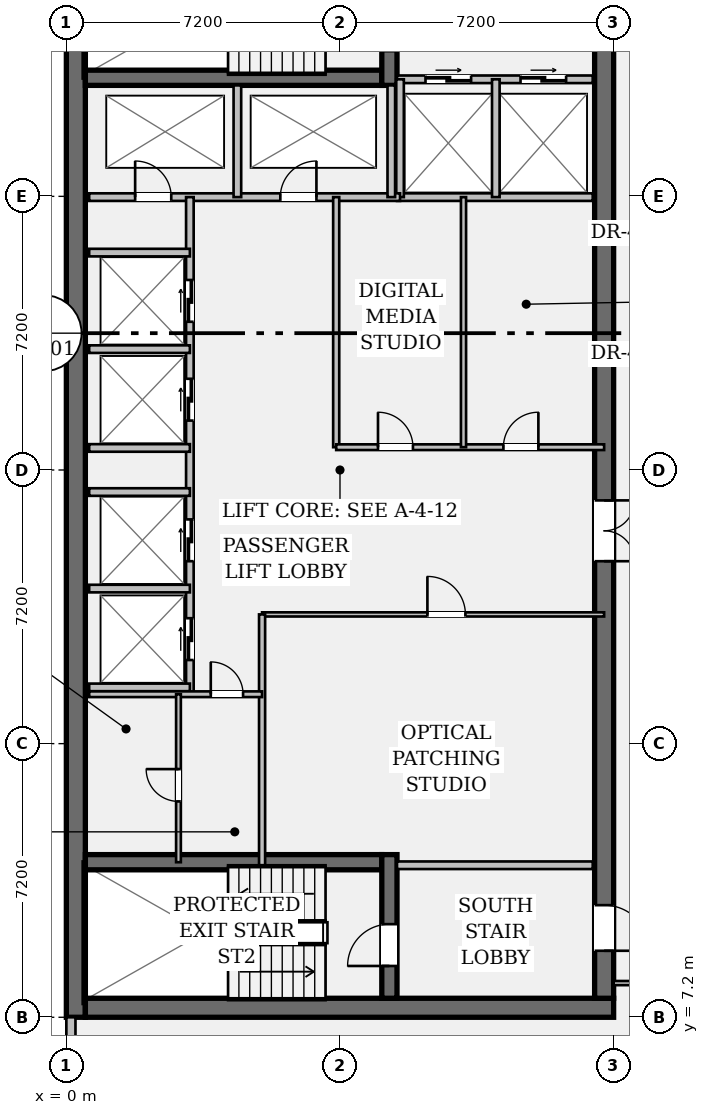
"""IFC4 building model, lengths in metres.
Left out: names, types, materials, properties, quantities, classifications, styles, units other than length and angle.
Written with IfcOpenShell. Run it as: python <this file> out.ifc"""

import sys

from ifc_helpers import new_model, si_unit, direction, frame, frame_2d, origin, place, context, subcontext, project, spatial, rectangle, extrude, element, fill, save


model = new_model("IFC4")
c1 = context("Model", 3, precision=1e-05, world=origin(), true_north=direction((0.0, 1.0)))
c2 = subcontext(c1, "Body", "Model", "MODEL_VIEW")
j1 = project(units=[si_unit("LENGTHUNIT", "METRE"), si_unit("PLANEANGLEUNIT", "RADIAN")], contexts=[c1])
p1 = place(None, origin())
s1 = spatial("IfcSite", under=j1, at=p1, CompositionType="ELEMENT")
p2 = place(p1, origin())
s2 = spatial("IfcBuilding", under=s1, at=p2, CompositionType="ELEMENT")
p3 = place(p2, frame((0.0, 0.0, 187.25)))
s3 = spatial("IfcBuildingStorey", under=s2, at=p3, CompositionType="ELEMENT", Elevation=187.25)
p4 = place(p3, frame((0.25, 7.2, 0.0), z_axis=(0.0, 0.0, 1.0), x_axis=(0.0, 1.0, 0.0)))
e1 = element("IfcWall", 1, at=p4, inside=s3, PredefinedType="SHEAR", context=c2, shape_type="SweptSolid", body=[
    extrude(rectangle(XDim=28.8, YDim=0.5, at=frame_2d((14.4, 0.0))), origin(), (0.0, 0.0, 1.0), 3.24),
])
p5 = place(p3, frame((0.5, 7.45, 0.0), z_axis=(0.0, 0.0, 1.0), x_axis=(1.0, 0.0, 0.0)))
e2 = element("IfcWall", 2, at=p5, inside=s3, PredefinedType="SHEAR", context=c2, shape_type="SweptSolid", body=[
    extrude(rectangle(XDim=13.9, YDim=0.5, at=frame_2d((6.95, 0.0))), origin(), (0.0, 0.0, 1.0), 3.24),
])
p6 = place(p3, frame((14.15, 35.5, 0.0), z_axis=(0.0, 0.0, 1.0), x_axis=(0.0, -1.0, 0.0)))
e3 = element("IfcWall", 3, at=p6, inside=s3, PredefinedType="SHEAR", context=c2, shape_type="SweptSolid", body=[
    extrude(rectangle(XDim=27.8, YDim=0.5, at=frame_2d((13.9, 0.0))), origin(), (0.0, 0.0, 1.0), 3.24),
])
p7 = place(p6, frame((1.4, 0.0, 0.0)))
e4 = element("IfcOpeningElement", 4, at=p7, cuts=e3, PredefinedType="OPENING", context=c2, shape_type="SweptSolid", body=[
    extrude(rectangle(XDim=1.2, YDim=2.15, at=frame_2d((0.6, 1.075))), frame((0.0, 0.262, 0.0), z_axis=(0.0, -1.0, 0.0), x_axis=(1.0, 0.0, 0.0)), (0.0, 0.0, 1.0), 0.524),
])
p8 = place(p6, frame((25.35, 0.0, 0.0)))
e5 = element("IfcOpeningElement", 5, at=p8, cuts=e3, PredefinedType="OPENING", context=c2, shape_type="SweptSolid", body=[
    extrude(rectangle(XDim=1.2, YDim=2.15, at=frame_2d((0.6, 1.075))), frame((0.0, 0.262, 0.0), z_axis=(0.0, -1.0, 0.0), x_axis=(1.0, 0.0, 0.0)), (0.0, 0.0, 1.0), 0.524),
])
p9 = place(p6, frame((14.7, 0.0, 0.0)))
e6 = element("IfcOpeningElement", 6, at=p9, cuts=e3, PredefinedType="OPENING", context=c2, shape_type="SweptSolid", body=[
    extrude(rectangle(XDim=1.6, YDim=2.2, at=frame_2d((0.8, 1.1))), frame((0.0, 0.262, 0.0), z_axis=(0.0, -1.0, 0.0), x_axis=(1.0, 0.0, 0.0)), (0.0, 0.0, 1.0), 0.524),
])
for number, where, z_axis, x_axis in (
    (7, (0.5, 31.92, 0.0), (0.0, 0.0, 1.0), (1.0, 0.0, 0.0)),
    (8, (0.5, 11.28, 0.0), (0.0, 0.0, 1.0), (1.0, 0.0, 0.0)),
):
    element("IfcWall", number, at=place(p3, frame(where, z_axis=z_axis, x_axis=x_axis)), inside=s3, PredefinedType="SHEAR", context=c2, shape_type="SweptSolid", body=[
        extrude(rectangle(XDim=7.8, YDim=0.4, at=frame_2d((3.9, 0.0))), origin(), (0.0, 0.0, 1.0), 3.24),
    ])
p10 = place(p3, frame((8.5, 31.72, 0.0), z_axis=(0.0, 0.0, 1.0), x_axis=(0.0, 1.0, 0.0)))
e9 = element("IfcWall", 9, at=p10, inside=s3, PredefinedType="SHEAR", context=c2, shape_type="SweptSolid", body=[
    extrude(rectangle(XDim=3.78, YDim=0.4, at=frame_2d((1.89, 0.0))), origin(), (0.0, 0.0, 1.0), 3.24),
])
p11 = place(p10, frame((0.9, 0.0, 0.0)))
e10 = element("IfcOpeningElement", 10, at=p11, cuts=e9, PredefinedType="OPENING", context=c2, shape_type="SweptSolid", body=[
    extrude(rectangle(XDim=1.1, YDim=2.15, at=frame_2d((0.55, 1.075))), frame((0.0, 0.212, 0.0), z_axis=(0.0, -1.0, 0.0), x_axis=(1.0, 0.0, 0.0)), (0.0, 0.0, 1.0), 0.424),
])
p12 = place(p3, frame((8.5, 7.7, 0.0), z_axis=(0.0, 0.0, 1.0), x_axis=(0.0, 1.0, 0.0)))
e11 = element("IfcWall", 11, at=p12, inside=s3, PredefinedType="SHEAR", context=c2, shape_type="SweptSolid", body=[
    extrude(rectangle(XDim=3.78, YDim=0.4, at=frame_2d((1.89, 0.0))), origin(), (0.0, 0.0, 1.0), 3.24),
])
p13 = place(p12, frame((0.85, 0.0, 0.0)))
e12 = element("IfcOpeningElement", 12, at=p13, cuts=e11, PredefinedType="OPENING", context=c2, shape_type="SweptSolid", body=[
    extrude(rectangle(XDim=1.1, YDim=2.15, at=frame_2d((0.55, 1.075))), frame((0.0, 0.212, 0.0), z_axis=(0.0, -1.0, 0.0), x_axis=(1.0, 0.0, 0.0)), (0.0, 0.0, 1.0), 0.424),
])
p14 = place(p3, frame((0.12, 5.87, 0.0), z_axis=(0.0, 0.0, 1.0), x_axis=(0.0, 1.0, 0.0)))
e13 = element("IfcWall", 13, at=p14, inside=s3, PredefinedType="STANDARD", context=c2, shape_type="SweptSolid", body=[
    extrude(rectangle(XDim=1.33, YDim=0.24, at=frame_2d((0.665, 0.0))), origin(), (0.0, 0.0, 1.0), 3.24),
])
p15 = place(p3, frame((8.7, 31.88, 0.0), z_axis=(0.0, 0.0, 1.0), x_axis=(1.0, 0.0, 0.0)))
e14 = element("IfcWall", 14, at=p15, inside=s3, PredefinedType="PARTITIONING", context=c2, shape_type="SweptSolid", body=[
    extrude(rectangle(XDim=5.15, YDim=0.2, at=frame_2d((2.575, 0.0))), origin(), (0.0, 0.0, 1.0), 3.24),
])
p16 = place(p15, frame((0.75, 0.0, 0.0)))
e15 = element("IfcOpeningElement", 15, at=p16, cuts=e14, PredefinedType="OPENING", context=c2, shape_type="SweptSolid", body=[
    extrude(rectangle(XDim=1.2, YDim=2.2, at=frame_2d((0.6, 1.1))), frame((0.0, 0.112, 0.0), z_axis=(0.0, -1.0, 0.0), x_axis=(1.0, 0.0, 0.0)), (0.0, 0.0, 1.0), 0.224),
])
p17 = place(p15, frame((3.25, 0.0, 0.0)))
e16 = element("IfcOpeningElement", 16, at=p17, cuts=e14, PredefinedType="OPENING", context=c2, shape_type="SweptSolid", body=[
    extrude(rectangle(XDim=1.2, YDim=2.2, at=frame_2d((0.6, 1.1))), frame((0.0, 0.112, 0.0), z_axis=(0.0, -1.0, 0.0), x_axis=(1.0, 0.0, 0.0)), (0.0, 0.0, 1.0), 0.224),
])
for number, where, z_axis, x_axis in (
    (17, (8.7, 11.2, 0.0), (0.0, 0.0, 1.0), (1.0, 0.0, 0.0)),
    (18, (8.7, 28.78, 0.0), (0.0, 0.0, 1.0), (1.0, 0.0, 0.0)),
):
    element("IfcWall", number, at=place(p3, frame(where, z_axis=z_axis, x_axis=x_axis)), inside=s3, PredefinedType="PARTITIONING", context=c2, shape_type="SweptSolid", body=[
        extrude(rectangle(XDim=5.15, YDim=0.2, at=frame_2d((2.575, 0.0))), origin(), (0.0, 0.0, 1.0), 3.24),
    ])
for number, where, z_axis, x_axis in (
    (19, (8.78, 28.78, 0.0), (0.0, 0.0, 1.0), (0.0, 1.0, 0.0)),
    (20, (11.3, 28.78, 0.0), (0.0, 0.0, 1.0), (0.0, 1.0, 0.0)),
):
    element("IfcWall", number, at=place(p3, frame(where, z_axis=z_axis, x_axis=x_axis)), inside=s3, PredefinedType="PARTITIONING", context=c2, shape_type="SweptSolid", body=[
        extrude(rectangle(XDim=3.1, YDim=0.2, at=frame_2d((1.55, 0.0))), origin(), (0.0, 0.0, 1.0), 3.24),
    ])
p18 = place(p3, frame((0.6, 28.78, 0.0), z_axis=(0.0, 0.0, 1.0), x_axis=(1.0, 0.0, 0.0)))
e21 = element("IfcWall", 21, at=p18, inside=s3, PredefinedType="PARTITIONING", context=c2, shape_type="SweptSolid", body=[
    extrude(rectangle(XDim=8.18, YDim=0.2, at=frame_2d((4.09, 0.0))), origin(), (0.0, 0.0, 1.0), 3.24),
])
p19 = place(p18, frame((1.21, 0.0, 0.0)))
e22 = element("IfcOpeningElement", 22, at=p19, cuts=e21, PredefinedType="OPENING", context=c2, shape_type="SweptSolid", body=[
    extrude(rectangle(XDim=0.95, YDim=2.15, at=frame_2d((0.475, 1.075))), frame((0.0, 0.112, 0.0), z_axis=(0.0, -1.0, 0.0), x_axis=(1.0, 0.0, 0.0)), (0.0, 0.0, 1.0), 0.224),
])
p20 = place(p18, frame((5.03, 0.0, 0.0)))
e23 = element("IfcOpeningElement", 23, at=p20, cuts=e21, PredefinedType="OPENING", context=c2, shape_type="SweptSolid", body=[
    extrude(rectangle(XDim=0.95, YDim=2.15, at=frame_2d((0.475, 1.075))), frame((0.0, 0.112, 0.0), z_axis=(0.0, -1.0, 0.0), x_axis=(1.0, 0.0, 0.0)), (0.0, 0.0, 1.0), 0.224),
])
for number, where, z_axis, x_axis in (
    (24, (4.5, 28.78, 0.0), (0.0, 0.0, 1.0), (0.0, 1.0, 0.0)),
    (25, (8.55, 28.78, 0.0), (0.0, 0.0, 1.0), (0.0, 1.0, 0.0)),
):
    element("IfcWall", number, at=place(p3, frame(where, z_axis=z_axis, x_axis=x_axis)), inside=s3, PredefinedType="PARTITIONING", context=c2, shape_type="SweptSolid", body=[
        extrude(rectangle(XDim=2.94, YDim=0.2, at=frame_2d((1.47, 0.0))), origin(), (0.0, 0.0, 1.0), 3.24),
    ])
p21 = place(p3, frame((3.25, 15.7, 0.0), z_axis=(0.0, 0.0, 1.0), x_axis=(0.0, 1.0, 0.0)))
e26 = element("IfcWall", 26, at=p21, inside=s3, PredefinedType="PARTITIONING", context=c2, shape_type="SweptSolid", body=[
    extrude(rectangle(XDim=13.08, YDim=0.2, at=frame_2d((6.54, 0.0))), origin(), (0.0, 0.0, 1.0), 3.24),
])
p22 = place(p21, frame((0.9, 0.0, 0.0)))
e27 = element("IfcOpeningElement", 27, at=p22, cuts=e26, PredefinedType="OPENING", context=c2, shape_type="SweptSolid", body=[
    extrude(rectangle(XDim=1.1, YDim=2.2, at=frame_2d((0.55, 1.1))), frame((0.0, 0.112, 0.0), z_axis=(0.0, -1.0, 0.0), x_axis=(1.0, 0.0, 0.0)), (0.0, 0.0, 1.0), 0.224),
])
p23 = place(p21, frame((3.5, 0.0, 0.0)))
e28 = element("IfcOpeningElement", 28, at=p23, cuts=e26, PredefinedType="OPENING", context=c2, shape_type="SweptSolid", body=[
    extrude(rectangle(XDim=1.1, YDim=2.2, at=frame_2d((0.55, 1.1))), frame((0.0, 0.112, 0.0), z_axis=(0.0, -1.0, 0.0), x_axis=(1.0, 0.0, 0.0)), (0.0, 0.0, 1.0), 0.224),
])
p24 = place(p21, frame((7.2, 0.0, 0.0)))
e29 = element("IfcOpeningElement", 29, at=p24, cuts=e26, PredefinedType="OPENING", context=c2, shape_type="SweptSolid", body=[
    extrude(rectangle(XDim=1.1, YDim=2.2, at=frame_2d((0.55, 1.1))), frame((0.0, 0.112, 0.0), z_axis=(0.0, -1.0, 0.0), x_axis=(1.0, 0.0, 0.0)), (0.0, 0.0, 1.0), 0.224),
])
p25 = place(p21, frame((9.8, 0.0, 0.0)))
e30 = element("IfcOpeningElement", 30, at=p25, cuts=e26, PredefinedType="OPENING", context=c2, shape_type="SweptSolid", body=[
    extrude(rectangle(XDim=1.1, YDim=2.2, at=frame_2d((0.55, 1.1))), frame((0.0, 0.112, 0.0), z_axis=(0.0, -1.0, 0.0), x_axis=(1.0, 0.0, 0.0)), (0.0, 0.0, 1.0), 0.224),
])
for number, where, z_axis, x_axis in (
    (31, (0.6, 15.88, 0.0), (0.0, 0.0, 1.0), (1.0, 0.0, 0.0)),
    (32, (0.6, 18.48, 0.0), (0.0, 0.0, 1.0), (1.0, 0.0, 0.0)),
    (33, (0.6, 22.18, 0.0), (0.0, 0.0, 1.0), (1.0, 0.0, 0.0)),
    (34, (0.6, 24.78, 0.0), (0.0, 0.0, 1.0), (1.0, 0.0, 0.0)),
    (35, (0.6, 21.02, 0.0), (0.0, 0.0, 1.0), (1.0, 0.0, 0.0)),
    (36, (0.6, 27.32, 0.0), (0.0, 0.0, 1.0), (1.0, 0.0, 0.0)),
):
    element("IfcWall", number, at=place(p3, frame(where, z_axis=z_axis, x_axis=x_axis)), inside=s3, PredefinedType="PARTITIONING", context=c2, shape_type="SweptSolid", body=[
        extrude(rectangle(XDim=2.65, YDim=0.2, at=frame_2d((1.325, 0.0))), origin(), (0.0, 0.0, 1.0), 3.24),
    ])
p26 = place(p3, frame((7.1, 22.2, 0.0), z_axis=(0.0, 0.0, 1.0), x_axis=(0.0, 1.0, 0.0)))
e37 = element("IfcWall", 37, at=p26, inside=s3, PredefinedType="PARTITIONING", context=c2, shape_type="SweptSolid", body=[
    extrude(rectangle(XDim=6.58, YDim=0.16, at=frame_2d((3.29, 0.0))), origin(), (0.0, 0.0, 1.0), 3.24),
])
p27 = place(p3, frame((7.1, 22.2, 0.0), z_axis=(0.0, 0.0, 1.0), x_axis=(1.0, 0.0, 0.0)))
e38 = element("IfcWall", 38, at=p27, inside=s3, PredefinedType="PARTITIONING", context=c2, shape_type="SweptSolid", body=[
    extrude(rectangle(XDim=7.05, YDim=0.15, at=frame_2d((3.525, 0.0))), origin(), (0.0, 0.0, 1.0), 3.24),
])
p28 = place(p27, frame((1.1, 0.0, 0.0)))
e39 = element("IfcOpeningElement", 39, at=p28, cuts=e38, PredefinedType="OPENING", context=c2, shape_type="SweptSolid", body=[
    extrude(rectangle(XDim=0.92, YDim=2.15, at=frame_2d((0.46, 1.075))), frame((0.0, 0.087, 0.0), z_axis=(0.0, -1.0, 0.0), x_axis=(1.0, 0.0, 0.0)), (0.0, 0.0, 1.0), 0.174),
])
p29 = place(p27, frame((4.4, 0.0, 0.0)))
e40 = element("IfcOpeningElement", 40, at=p29, cuts=e38, PredefinedType="OPENING", context=c2, shape_type="SweptSolid", body=[
    extrude(rectangle(XDim=0.92, YDim=2.15, at=frame_2d((0.46, 1.075))), frame((0.0, 0.087, 0.0), z_axis=(0.0, -1.0, 0.0), x_axis=(1.0, 0.0, 0.0)), (0.0, 0.0, 1.0), 0.174),
])
p30 = place(p3, frame((10.45, 22.2, 0.0), z_axis=(0.0, 0.0, 1.0), x_axis=(0.0, 1.0, 0.0)))
e41 = element("IfcWall", 41, at=p30, inside=s3, PredefinedType="PARTITIONING", context=c2, shape_type="SweptSolid", body=[
    extrude(rectangle(XDim=6.58, YDim=0.135, at=frame_2d((3.29, 0.0))), origin(), (0.0, 0.0, 1.0), 3.24),
])
p31 = place(p3, frame((5.15, 17.8, 0.0), z_axis=(0.0, 0.0, 1.0), x_axis=(1.0, 0.0, 0.0)))
e42 = element("IfcWall", 42, at=p31, inside=s3, PredefinedType="PARTITIONING", context=c2, shape_type="SweptSolid", body=[
    extrude(rectangle(XDim=9.0, YDim=0.11, at=frame_2d((4.5, 0.0))), origin(), (0.0, 0.0, 1.0), 3.24),
])
p32 = place(p31, frame((4.35, 0.0, 0.0)))
e43 = element("IfcOpeningElement", 43, at=p32, cuts=e42, PredefinedType="OPENING", context=c2, shape_type="SweptSolid", body=[
    extrude(rectangle(XDim=1.0, YDim=2.15, at=frame_2d((0.5, 1.075))), frame((0.0, 0.067, 0.0), z_axis=(0.0, -1.0, 0.0), x_axis=(1.0, 0.0, 0.0)), (0.0, 0.0, 1.0), 0.134),
])
p33 = place(p3, frame((5.15, 11.2, 0.0), z_axis=(0.0, 0.0, 1.0), x_axis=(0.0, 1.0, 0.0)))
e44 = element("IfcWall", 44, at=p33, inside=s3, PredefinedType="PARTITIONING", context=c2, shape_type="SweptSolid", body=[
    extrude(rectangle(XDim=6.6, YDim=0.16, at=frame_2d((3.3, 0.0))), origin(), (0.0, 0.0, 1.0), 3.24),
])
p34 = place(p3, frame((0.6, 15.7, 0.0), z_axis=(0.0, 0.0, 1.0), x_axis=(1.0, 0.0, 0.0)))
e45 = element("IfcWall", 45, at=p34, inside=s3, PredefinedType="PARTITIONING", context=c2, shape_type="SweptSolid", body=[
    extrude(rectangle(XDim=4.55, YDim=0.15, at=frame_2d((2.275, 0.0))), origin(), (0.0, 0.0, 1.0), 3.24),
])
p35 = place(p34, frame((3.2, 0.0, 0.0)))
e46 = element("IfcOpeningElement", 46, at=p35, cuts=e45, PredefinedType="OPENING", context=c2, shape_type="SweptSolid", body=[
    extrude(rectangle(XDim=0.85, YDim=2.15, at=frame_2d((0.425, 1.075))), frame((0.0, 0.087, 0.0), z_axis=(0.0, -1.0, 0.0), x_axis=(1.0, 0.0, 0.0)), (0.0, 0.0, 1.0), 0.174),
])
p36 = place(p3, frame((2.95, 11.28, 0.0), z_axis=(0.0, 0.0, 1.0), x_axis=(0.0, 1.0, 0.0)))
e47 = element("IfcWall", 47, at=p36, inside=s3, PredefinedType="PARTITIONING", context=c2, shape_type="SweptSolid", body=[
    extrude(rectangle(XDim=4.42, YDim=0.125, at=frame_2d((2.21, 0.0))), origin(), (0.0, 0.0, 1.0), 3.24),
])
p37 = place(p36, frame((1.6, 0.0, 0.0)))
e48 = element("IfcOpeningElement", 48, at=p37, cuts=e47, PredefinedType="OPENING", context=c2, shape_type="SweptSolid", body=[
    extrude(rectangle(XDim=0.85, YDim=2.15, at=frame_2d((0.425, 1.075))), frame((0.0, 0.074, 0.0), z_axis=(0.0, -1.0, 0.0), x_axis=(1.0, 0.0, 0.0)), (0.0, 0.0, 1.0), 0.149),
])
p38 = place(p3, frame((14.4, 8.1, 0.0), z_axis=(0.0, 0.0, 1.0), x_axis=(1.0, 0.0, 0.0)))
e49 = element("IfcWall", 49, at=p38, inside=s3, PredefinedType="PARTITIONING", context=c2, shape_type="SweptSolid", body=[
    extrude(rectangle(XDim=2.95, YDim=0.11, at=frame_2d((1.475, 0.0))), origin(), (0.0, 0.0, 1.0), 2.808),
])
p39 = place(p38, frame((0.95, 0.0, 0.0)))
e50 = element("IfcOpeningElement", 50, at=p39, cuts=e49, PredefinedType="OPENING", context=c2, shape_type="SweptSolid", body=[
    extrude(rectangle(XDim=0.92, YDim=2.15, at=frame_2d((0.46, 1.075))), frame((0.0, 0.067, 0.0), z_axis=(0.0, -1.0, 0.0), x_axis=(1.0, 0.0, 0.0)), (0.0, 0.0, 1.0), 0.134),
])
p40 = place(p13, origin())
e51 = element("IfcDoor", 51, at=p40, inside=s3, OperationType="SINGLE_SWING_LEFT", PredefinedType="DOOR", context=c2, shape_type="SweptSolid", body=[
    extrude(rectangle(XDim=1.1, YDim=2.15, at=frame_2d((0.55, 1.075))), frame((0.0, 0.025, 0.0), z_axis=(0.0, -1.0, 0.0), x_axis=(1.0, 0.0, 0.0)), (0.0, 0.0, 1.0), 0.05),
])
fill(e12, e51)
p41 = place(p8, origin())
e52 = element("IfcDoor", 52, at=p41, inside=s3, OperationType="SINGLE_SWING_RIGHT", PredefinedType="DOOR", context=c2, shape_type="SweptSolid", body=[
    extrude(rectangle(XDim=1.2, YDim=2.15, at=frame_2d((0.6, 1.075))), frame((0.0, 0.025, 0.0), z_axis=(0.0, -1.0, 0.0), x_axis=(1.0, 0.0, 0.0)), (0.0, 0.0, 1.0), 0.05),
])
fill(e5, e52)
p42 = place(p16, origin())
e53 = element("IfcDoor", 53, at=p42, inside=s3, OperationType="DOUBLE_DOOR_SLIDING", PredefinedType="DOOR", context=c2, shape_type="SweptSolid", body=[
    extrude(rectangle(XDim=1.2, YDim=2.2, at=frame_2d((0.6, 1.1))), frame((0.0, 0.025, 0.0), z_axis=(0.0, -1.0, 0.0), x_axis=(1.0, 0.0, 0.0)), (0.0, 0.0, 1.0), 0.05),
])
fill(e15, e53)
p43 = place(p17, origin())
e54 = element("IfcDoor", 54, at=p43, inside=s3, OperationType="DOUBLE_DOOR_SLIDING", PredefinedType="DOOR", context=c2, shape_type="SweptSolid", body=[
    extrude(rectangle(XDim=1.2, YDim=2.2, at=frame_2d((0.6, 1.1))), frame((0.0, 0.025, 0.0), z_axis=(0.0, -1.0, 0.0), x_axis=(1.0, 0.0, 0.0)), (0.0, 0.0, 1.0), 0.05),
])
fill(e16, e54)
p44 = place(p19, origin())
e55 = element("IfcDoor", 55, at=p44, inside=s3, OperationType="SINGLE_SWING_LEFT", PredefinedType="DOOR", context=c2, shape_type="SweptSolid", body=[
    extrude(rectangle(XDim=0.95, YDim=2.15, at=frame_2d((0.475, 1.075))), frame((0.0, 0.025, 0.0), z_axis=(0.0, -1.0, 0.0), x_axis=(1.0, 0.0, 0.0)), (0.0, 0.0, 1.0), 0.05),
])
fill(e22, e55)
p45 = place(p20, origin())
e56 = element("IfcDoor", 56, at=p45, inside=s3, OperationType="SINGLE_SWING_RIGHT", PredefinedType="DOOR", context=c2, shape_type="SweptSolid", body=[
    extrude(rectangle(XDim=0.95, YDim=2.15, at=frame_2d((0.475, 1.075))), frame((0.0, 0.025, 0.0), z_axis=(0.0, -1.0, 0.0), x_axis=(1.0, 0.0, 0.0)), (0.0, 0.0, 1.0), 0.05),
])
fill(e23, e56)
p46 = place(p9, origin())
e57 = element("IfcDoor", 57, at=p46, inside=s3, OperationType="DOUBLE_DOOR_SINGLE_SWING", PredefinedType="DOOR", context=c2, shape_type="SweptSolid", body=[
    extrude(rectangle(XDim=1.6, YDim=2.2, at=frame_2d((0.8, 1.1))), frame((0.0, 0.025, 0.0), z_axis=(0.0, -1.0, 0.0), x_axis=(1.0, 0.0, 0.0)), (0.0, 0.0, 1.0), 0.05),
])
fill(e6, e57)
p47 = place(p22, origin())
e58 = element("IfcDoor", 58, at=p47, inside=s3, OperationType="DOUBLE_DOOR_SLIDING", PredefinedType="DOOR", context=c2, shape_type="SweptSolid", body=[
    extrude(rectangle(XDim=1.1, YDim=2.2, at=frame_2d((0.55, 1.1))), frame((0.0, 0.025, 0.0), z_axis=(0.0, -1.0, 0.0), x_axis=(1.0, 0.0, 0.0)), (0.0, 0.0, 1.0), 0.05),
])
fill(e27, e58)
p48 = place(p23, origin())
e59 = element("IfcDoor", 59, at=p48, inside=s3, OperationType="DOUBLE_DOOR_SLIDING", PredefinedType="DOOR", context=c2, shape_type="SweptSolid", body=[
    extrude(rectangle(XDim=1.1, YDim=2.2, at=frame_2d((0.55, 1.1))), frame((0.0, 0.025, 0.0), z_axis=(0.0, -1.0, 0.0), x_axis=(1.0, 0.0, 0.0)), (0.0, 0.0, 1.0), 0.05),
])
fill(e28, e59)
p49 = place(p24, origin())
e60 = element("IfcDoor", 60, at=p49, inside=s3, OperationType="DOUBLE_DOOR_SLIDING", PredefinedType="DOOR", context=c2, shape_type="SweptSolid", body=[
    extrude(rectangle(XDim=1.1, YDim=2.2, at=frame_2d((0.55, 1.1))), frame((0.0, 0.025, 0.0), z_axis=(0.0, -1.0, 0.0), x_axis=(1.0, 0.0, 0.0)), (0.0, 0.0, 1.0), 0.05),
])
fill(e29, e60)
p50 = place(p25, origin())
e61 = element("IfcDoor", 61, at=p50, inside=s3, OperationType="DOUBLE_DOOR_SLIDING", PredefinedType="DOOR", context=c2, shape_type="SweptSolid", body=[
    extrude(rectangle(XDim=1.1, YDim=2.2, at=frame_2d((0.55, 1.1))), frame((0.0, 0.025, 0.0), z_axis=(0.0, -1.0, 0.0), x_axis=(1.0, 0.0, 0.0)), (0.0, 0.0, 1.0), 0.05),
])
fill(e30, e61)
p51 = place(p28, origin())
e62 = element("IfcDoor", 62, at=p51, inside=s3, OperationType="SINGLE_SWING_LEFT", PredefinedType="DOOR", context=c2, shape_type="SweptSolid", body=[
    extrude(rectangle(XDim=0.92, YDim=2.15, at=frame_2d((0.46, 1.075))), frame((0.0, 0.025, 0.0), z_axis=(0.0, -1.0, 0.0), x_axis=(1.0, 0.0, 0.0)), (0.0, 0.0, 1.0), 0.05),
])
fill(e39, e62)
p52 = place(p29, origin())
e63 = element("IfcDoor", 63, at=p52, inside=s3, OperationType="SINGLE_SWING_RIGHT", PredefinedType="DOOR", context=c2, shape_type="SweptSolid", body=[
    extrude(rectangle(XDim=0.92, YDim=2.15, at=frame_2d((0.46, 1.075))), frame((0.0, 0.025, 0.0), z_axis=(0.0, -1.0, 0.0), x_axis=(1.0, 0.0, 0.0)), (0.0, 0.0, 1.0), 0.05),
])
fill(e40, e63)
p53 = place(p32, origin())
e64 = element("IfcDoor", 64, at=p53, inside=s3, OperationType="SINGLE_SWING_LEFT", PredefinedType="DOOR", context=c2, shape_type="SweptSolid", body=[
    extrude(rectangle(XDim=1.0, YDim=2.15, at=frame_2d((0.5, 1.075))), frame((0.0, 0.025, 0.0), z_axis=(0.0, -1.0, 0.0), x_axis=(1.0, 0.0, 0.0)), (0.0, 0.0, 1.0), 0.05),
])
fill(e43, e64)
p54 = place(p35, origin())
e65 = element("IfcDoor", 65, at=p54, inside=s3, OperationType="SINGLE_SWING_LEFT", PredefinedType="DOOR", context=c2, shape_type="SweptSolid", body=[
    extrude(rectangle(XDim=0.85, YDim=2.15, at=frame_2d((0.425, 1.075))), frame((0.0, 0.025, 0.0), z_axis=(0.0, -1.0, 0.0), x_axis=(1.0, 0.0, 0.0)), (0.0, 0.0, 1.0), 0.05),
])
fill(e46, e65)
p55 = place(p37, origin())
e66 = element("IfcDoor", 66, at=p55, inside=s3, OperationType="SINGLE_SWING_RIGHT", PredefinedType="DOOR", context=c2, shape_type="SweptSolid", body=[
    extrude(rectangle(XDim=0.85, YDim=2.15, at=frame_2d((0.425, 1.075))), frame((0.0, 0.025, 0.0), z_axis=(0.0, -1.0, 0.0), x_axis=(1.0, 0.0, 0.0)), (0.0, 0.0, 1.0), 0.05),
])
fill(e48, e66)
save(model, sys.argv[1])
